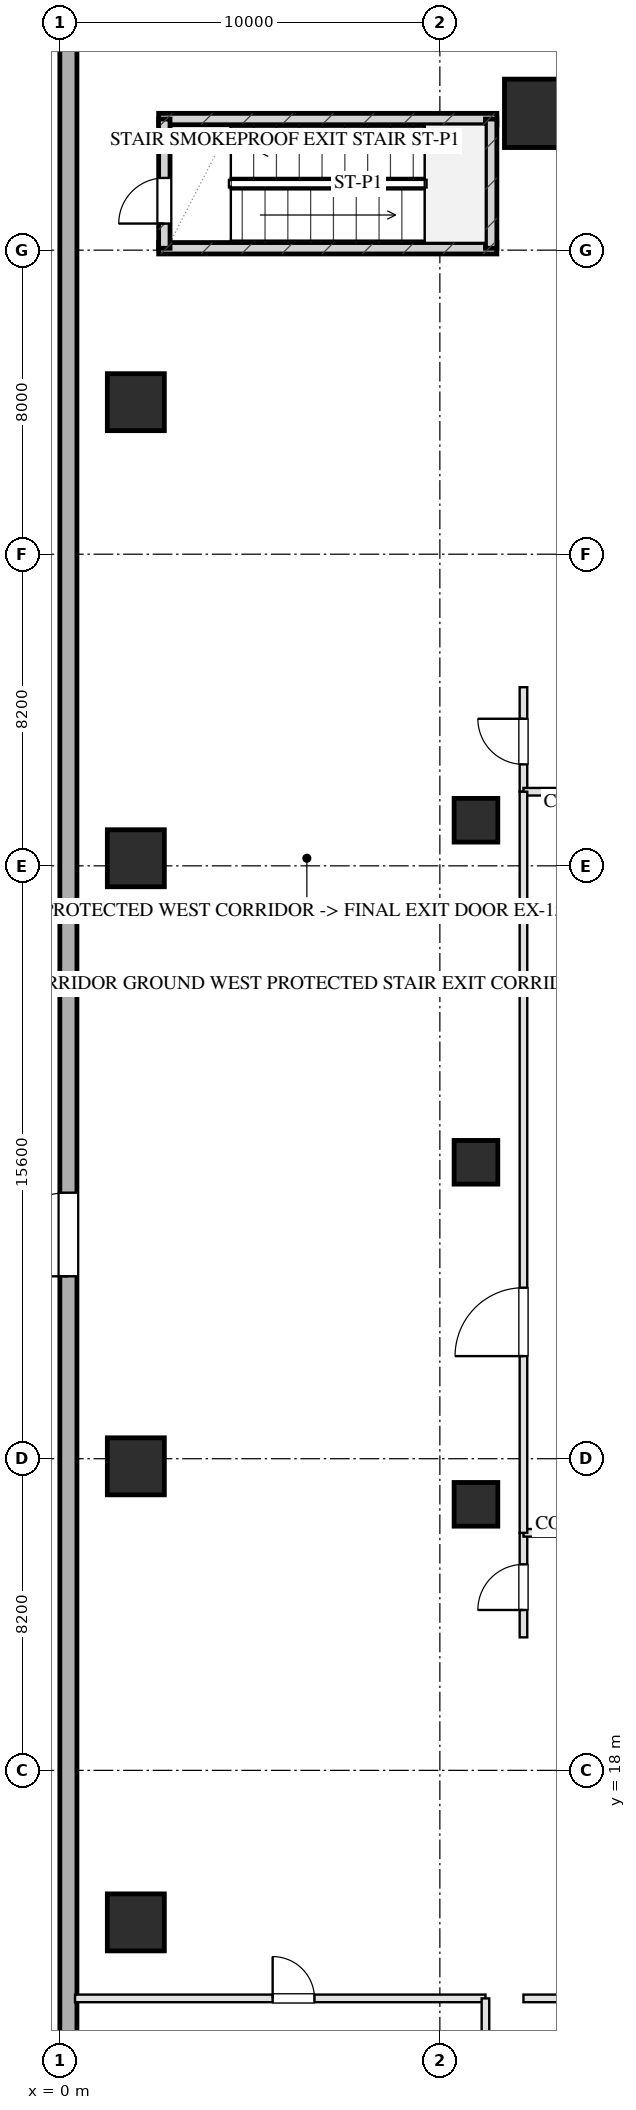
"""IFC4 building model, lengths in metres.
Left out: names, types, materials, properties, quantities, classifications, styles, units other than length and angle.
Written with IfcOpenShell. Run it as: python <this file> out.ifc"""

import sys

from ifc_helpers import new_model, si_unit, direction, frame, frame_2d, origin, origin_2d, place, context, subcontext, project, spatial, rectangle, hollow_rectangle, extrude, element, fill, save


model = new_model("IFC4")
c1 = context("Model", 3, precision=1e-05, world=origin(), true_north=direction((0.0, 1.0)))
c2 = subcontext(c1, "Body", "Model", "MODEL_VIEW")
j1 = project(units=[si_unit("LENGTHUNIT", "METRE"), si_unit("PLANEANGLEUNIT", "RADIAN")], contexts=[c1])
p1 = place(None, origin())
s1 = spatial("IfcSite", under=j1, at=p1, CompositionType="ELEMENT")
p2 = place(p1, origin())
s2 = spatial("IfcBuilding", under=s1, at=p2, CompositionType="ELEMENT")
p3 = place(p2, origin())
s3 = spatial("IfcBuildingStorey", under=s2, at=p3, CompositionType="ELEMENT", Elevation=0.0)
for number, where, z_axis, x_axis in (
    (1, (2.6, 58.05, 0.0), (0.0, 0.0, 1.0), (1.0, 0.0, 0.0)),
    (2, (2.6, 61.45, 0.0), (0.0, 0.0, 1.0), (1.0, 0.0, 0.0)),
):
    element("IfcWall", number, at=place(p3, frame(where, z_axis=z_axis, x_axis=x_axis)), inside=s3, PredefinedType="SHEAR", context=c2, shape_type="SweptSolid", body=[
        extrude(rectangle(XDim=8.9, YDim=0.3, at=frame_2d((4.45, 0.0))), origin(), (0.0, 0.0, 1.0), 6.0),
    ])
p4 = place(p3, frame((11.35, 58.05, 0.0), z_axis=(0.0, 0.0, 1.0), x_axis=(0.0, 1.0, 0.0)))
e3 = element("IfcWall", 3, at=p4, inside=s3, PredefinedType="SHEAR", context=c2, shape_type="SweptSolid", body=[
    extrude(rectangle(XDim=3.4, YDim=0.3, at=frame_2d((1.7, 0.0))), origin(), (0.0, 0.0, 1.0), 6.0),
])
p5 = place(p3, frame((2.75, 58.05, 0.0), z_axis=(0.0, 0.0, 1.0), x_axis=(0.0, 1.0, 0.0)))
e4 = element("IfcWall", 4, at=p5, inside=s3, PredefinedType="SHEAR", context=c2, shape_type="SweptSolid", body=[
    extrude(rectangle(XDim=3.4, YDim=0.3, at=frame_2d((1.7, 0.0))), origin(), (0.0, 0.0, 1.0), 6.0),
])
p6 = place(p5, frame((0.65, 0.0, 0.0)))
e5 = element("IfcOpeningElement", 5, at=p6, cuts=e4, PredefinedType="OPENING", context=c2, shape_type="SweptSolid", body=[
    extrude(rectangle(XDim=1.2, YDim=2.05, at=frame_2d((0.6, 1.025))), frame((0.0, 0.16, 0.0), z_axis=(0.0, -1.0, 0.0), x_axis=(1.0, 0.0, 0.0)), (0.0, 0.0, 1.0), 0.32),
])
for number, where, z_axis, x_axis in (
    (6, (2.0, 14.0, 0.0), (0.0, 0.0, 1.0), (1.0, 0.0, 0.0)),
    (7, (2.0, 26.0, 0.0), (0.0, 0.0, 1.0), (1.0, 0.0, 0.0)),
    (8, (2.0, 42.0, 0.0), (0.0, 0.0, 1.0), (1.0, 0.0, 0.0)),
    (9, (2.0, 54.0, 0.0), (0.0, 0.0, 1.0), (1.0, 0.0, 0.0)),
):
    element("IfcColumn", number, at=place(p3, frame(where, z_axis=z_axis, x_axis=x_axis)), inside=s3, PredefinedType="COLUMN", context=c2, shape_type="SweptSolid", body=[
        extrude(rectangle(XDim=1.5, YDim=1.5, at=origin_2d()), origin(), (0.0, 0.0, 1.0), 6.001),
    ])
p7 = place(p3, frame((12.6, 61.6, 0.0), z_axis=(0.0, 0.0, 1.0), x_axis=(1.0, 0.0, 0.0)))
e10 = element("IfcColumn", 10, at=p7, inside=s3, PredefinedType="COLUMN", context=c2, shape_type="SweptSolid", body=[
    extrude(hollow_rectangle(XDim=1.8, YDim=1.8, WallThickness=0.06, at=origin_2d()), origin(), (0.0, 0.0, 1.0), 6.001),
])
for number, where, z_axis, x_axis in (
    (11, (10.95, 25.0, 0.0), (0.0, 0.0, 1.0), (1.0, 0.0, 0.0)),
    (12, (10.95, 34.0, 0.0), (0.0, 0.0, 1.0), (1.0, 0.0, 0.0)),
    (13, (10.95, 43.0, 0.0), (0.0, 0.0, 1.0), (1.0, 0.0, 0.0)),
):
    element("IfcColumn", number, at=place(p3, frame(where, z_axis=z_axis, x_axis=x_axis)), inside=s3, PredefinedType="COLUMN", context=c2, shape_type="SweptSolid", body=[
        extrude(hollow_rectangle(XDim=1.15, YDim=1.15, WallThickness=0.04, at=origin_2d()), origin(), (0.0, 0.0, 1.0), 6.001),
    ])
p8 = place(p3, frame((0.225, 0.0, 0.0), z_axis=(0.0, 0.0, 1.0), x_axis=(0.0, 1.0, 0.0)))
e14 = element("IfcWall", 14, at=p8, inside=s3, PredefinedType="SOLIDWALL", context=c2, shape_type="SweptSolid", body=[
    extrude(rectangle(XDim=68.0, YDim=0.45, at=frame_2d((34.0, 0.0))), origin(), (0.0, 0.0, 1.0), 5.7),
])
p9 = place(p8, frame((31.0, 0.0, 0.0)))
e15 = element("IfcOpeningElement", 15, at=p9, cuts=e14, PredefinedType="OPENING", context=c2, shape_type="SweptSolid", body=[
    extrude(rectangle(XDim=2.2, YDim=2.4, at=frame_2d((1.1, 1.2))), frame((0.0, 0.235, 0.0), z_axis=(0.0, -1.0, 0.0), x_axis=(1.0, 0.0, 0.0)), (0.0, 0.0, 1.0), 0.47),
])
p10 = place(p3, frame((0.4, 12.0, 0.0), z_axis=(0.0, 0.0, 1.0), x_axis=(1.0, 0.0, 0.0)))
e16 = element("IfcWall", 16, at=p10, inside=s3, PredefinedType="PARTITIONING", context=c2, shape_type="SweptSolid", body=[
    extrude(rectangle(XDim=10.8, YDim=0.2, at=frame_2d((5.4, 0.0))), origin(), (0.0, 0.0, 1.0), 5.685),
])
p11 = place(p10, frame((5.2, 0.0, 0.0)))
e17 = element("IfcOpeningElement", 17, at=p11, cuts=e16, PredefinedType="OPENING", context=c2, shape_type="SweptSolid", body=[
    extrude(rectangle(XDim=1.1, YDim=2.05, at=frame_2d((0.55, 1.025))), frame((0.0, 0.11, 0.0), z_axis=(0.0, -1.0, 0.0), x_axis=(1.0, 0.0, 0.0)), (0.0, 0.0, 1.0), 0.22),
])
p12 = place(p3, frame((11.2, 0.4, 0.0), z_axis=(0.0, 0.0, 1.0), x_axis=(0.0, 1.0, 0.0)))
e18 = element("IfcWall", 18, at=p12, inside=s3, PredefinedType="PARTITIONING", context=c2, shape_type="SweptSolid", body=[
    extrude(rectangle(XDim=11.6, YDim=0.2, at=frame_2d((5.8, 0.0))), origin(), (0.0, 0.0, 1.0), 5.685),
])
p13 = place(p3, frame((12.2, 12.0, 0.0), z_axis=(0.0, 0.0, 1.0), x_axis=(1.0, 0.0, 0.0)))
e19 = element("IfcWall", 19, at=p13, inside=s3, PredefinedType="PARTITIONING", context=c2, shape_type="SweptSolid", body=[
    extrude(rectangle(XDim=9.4, YDim=0.2, at=frame_2d((4.7, 0.0))), origin(), (0.0, 0.0, 1.0), 5.685),
])
p14 = place(p3, frame((12.2, 21.5, 0.0), z_axis=(0.0, 0.0, 1.0), x_axis=(0.0, 1.0, 0.0)))
e20 = element("IfcWall", 20, at=p14, inside=s3, PredefinedType="PARTITIONING", context=c2, shape_type="SweptSolid", body=[
    extrude(rectangle(XDim=2.75, YDim=0.2, at=frame_2d((1.375, 0.0))), origin(), (0.0, 0.0, 1.0), 5.685),
])
p15 = place(p14, frame((0.72, 0.0, 0.0)))
e21 = element("IfcOpeningElement", 21, at=p15, cuts=e20, PredefinedType="OPENING", context=c2, shape_type="SweptSolid", body=[
    extrude(rectangle(XDim=1.2, YDim=2.05, at=frame_2d((0.6, 1.025))), frame((0.0, 0.11, 0.0), z_axis=(0.0, -1.0, 0.0), x_axis=(1.0, 0.0, 0.0)), (0.0, 0.0, 1.0), 0.22),
])
p16 = place(p3, frame((12.2, 24.25, 0.0), z_axis=(0.0, 0.0, 1.0), x_axis=(1.0, 0.0, 0.0)))
e22 = element("IfcWall", 22, at=p16, inside=s3, PredefinedType="PARTITIONING", context=c2, shape_type="SweptSolid", body=[
    extrude(rectangle(XDim=26.1, YDim=0.2, at=frame_2d((13.05, 0.0))), origin(), (0.0, 0.0, 1.0), 5.685),
])
p17 = place(p3, frame((12.2, 43.75, 0.0), z_axis=(0.0, 0.0, 1.0), x_axis=(0.0, 1.0, 0.0)))
e23 = element("IfcWall", 23, at=p17, inside=s3, PredefinedType="PARTITIONING", context=c2, shape_type="SweptSolid", body=[
    extrude(rectangle(XDim=2.75, YDim=0.2, at=frame_2d((1.375, 0.0))), origin(), (0.0, 0.0, 1.0), 5.685),
])
p18 = place(p17, frame((0.72, 0.0, 0.0)))
e24 = element("IfcOpeningElement", 24, at=p18, cuts=e23, PredefinedType="OPENING", context=c2, shape_type="SweptSolid", body=[
    extrude(rectangle(XDim=1.2, YDim=2.05, at=frame_2d((0.6, 1.025))), frame((0.0, 0.11, 0.0), z_axis=(0.0, -1.0, 0.0), x_axis=(1.0, 0.0, 0.0)), (0.0, 0.0, 1.0), 0.22),
])
p19 = place(p3, frame((12.2, 43.75, 0.0), z_axis=(0.0, 0.0, 1.0), x_axis=(1.0, 0.0, 0.0)))
e25 = element("IfcWall", 25, at=p19, inside=s3, PredefinedType="PARTITIONING", context=c2, shape_type="SweptSolid", body=[
    extrude(rectangle(XDim=26.1, YDim=0.2, at=frame_2d((13.05, 0.0))), origin(), (0.0, 0.0, 1.0), 5.685),
])
p20 = place(p3, frame((12.2, 24.25, 0.0), z_axis=(0.0, 0.0, 1.0), x_axis=(0.0, 1.0, 0.0)))
e26 = element("IfcWall", 26, at=p20, inside=s3, PredefinedType="PARTITIONING", context=c2, shape_type="SweptSolid", body=[
    extrude(rectangle(XDim=19.5, YDim=0.2, at=frame_2d((9.75, 0.0))), origin(), (0.0, 0.0, 1.0), 5.685),
])
p21 = place(p20, frame((4.65, 0.0, 0.0)))
e27 = element("IfcOpeningElement", 27, at=p21, cuts=e26, PredefinedType="OPENING", context=c2, shape_type="SweptSolid", body=[
    extrude(rectangle(XDim=1.8, YDim=2.05, at=frame_2d((0.9, 1.025))), frame((0.0, 0.11, 0.0), z_axis=(0.0, -1.0, 0.0), x_axis=(1.0, 0.0, 0.0)), (0.0, 0.0, 1.0), 0.22),
])
p22 = place(p9, origin())
e28 = element("IfcDoor", 28, at=p22, inside=s3, OperationType="SINGLE_SWING_LEFT", PredefinedType="DOOR", context=c2, shape_type="SweptSolid", body=[
    extrude(rectangle(XDim=2.2, YDim=2.4, at=frame_2d((1.1, 1.2))), frame((0.0, 0.025, 0.0), z_axis=(0.0, -1.0, 0.0), x_axis=(1.0, 0.0, 0.0)), (0.0, 0.0, 1.0), 0.05),
])
fill(e15, e28)
p23 = place(p11, origin())
e29 = element("IfcDoor", 29, at=p23, inside=s3, OperationType="SINGLE_SWING_LEFT", PredefinedType="DOOR", context=c2, shape_type="SweptSolid", body=[
    extrude(rectangle(XDim=1.1, YDim=2.05, at=frame_2d((0.55, 1.025))), frame((0.0, 0.025, 0.0), z_axis=(0.0, -1.0, 0.0), x_axis=(1.0, 0.0, 0.0)), (0.0, 0.0, 1.0), 0.05),
])
fill(e17, e29)
p24 = place(p15, origin())
e30 = element("IfcDoor", 30, at=p24, inside=s3, OperationType="SINGLE_SWING_LEFT", PredefinedType="DOOR", context=c2, shape_type="SweptSolid", body=[
    extrude(rectangle(XDim=1.2, YDim=2.05, at=frame_2d((0.6, 1.025))), frame((0.0, 0.025, 0.0), z_axis=(0.0, -1.0, 0.0), x_axis=(1.0, 0.0, 0.0)), (0.0, 0.0, 1.0), 0.05),
])
fill(e21, e30)
p25 = place(p18, origin())
e31 = element("IfcDoor", 31, at=p25, inside=s3, OperationType="SINGLE_SWING_RIGHT", PredefinedType="DOOR", context=c2, shape_type="SweptSolid", body=[
    extrude(rectangle(XDim=1.2, YDim=2.05, at=frame_2d((0.6, 1.025))), frame((0.0, 0.025, 0.0), z_axis=(0.0, -1.0, 0.0), x_axis=(1.0, 0.0, 0.0)), (0.0, 0.0, 1.0), 0.05),
])
fill(e24, e31)
p26 = place(p21, origin())
e32 = element("IfcDoor", 32, at=p26, inside=s3, OperationType="SINGLE_SWING_LEFT", PredefinedType="DOOR", context=c2, shape_type="SweptSolid", body=[
    extrude(rectangle(XDim=1.8, YDim=2.05, at=frame_2d((0.9, 1.025))), frame((0.0, 0.025, 0.0), z_axis=(0.0, -1.0, 0.0), x_axis=(1.0, 0.0, 0.0)), (0.0, 0.0, 1.0), 0.05),
])
fill(e27, e32)
p27 = place(p6, origin())
e33 = element("IfcDoor", 33, at=p27, inside=s3, OperationType="SINGLE_SWING_LEFT", PredefinedType="DOOR", context=c2, shape_type="SweptSolid", body=[
    extrude(rectangle(XDim=1.2, YDim=2.05, at=frame_2d((0.6, 1.025))), frame((0.0, 0.025, 0.0), z_axis=(0.0, -1.0, 0.0), x_axis=(1.0, 0.0, 0.0)), (0.0, 0.0, 1.0), 0.05),
])
fill(e5, e33)
save(model, sys.argv[1])
